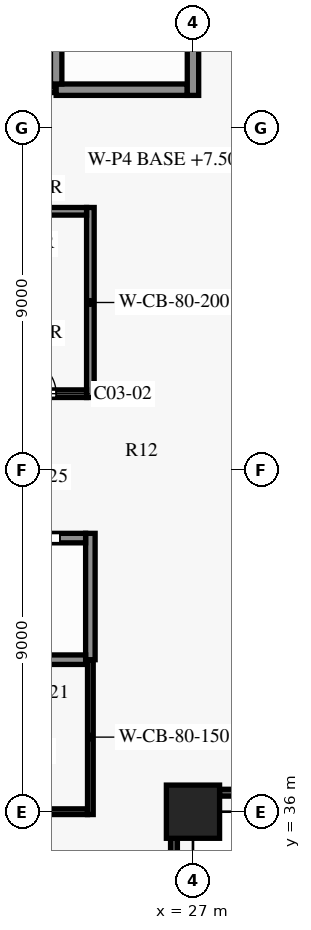
"""IFC4 building model, lengths in metres.
Left out: names, types, materials, properties, quantities, classifications, styles, units other than length and angle.
Written with IfcOpenShell. Run it as: python <this file> out.ifc"""

import sys

from ifc_helpers import new_model, si_unit, direction, frame, frame_2d, origin, origin_2d, place, context, subcontext, project, spatial, rectangle, extrude, element, fill, save


model = new_model("IFC4")
c1 = context("Model", 3, precision=1e-05, world=origin(), true_north=direction((0.0, 1.0)))
c2 = subcontext(c1, "Body", "Model", "MODEL_VIEW")
j1 = project(units=[si_unit("LENGTHUNIT", "METRE"), si_unit("PLANEANGLEUNIT", "RADIAN")], contexts=[c1])
p1 = place(None, origin())
s1 = spatial("IfcSite", under=j1, at=p1, CompositionType="ELEMENT")
p2 = place(p1, origin())
s2 = spatial("IfcBuilding", under=s1, at=p2, CompositionType="ELEMENT")
p3 = place(p2, frame((0.0, 0.0, 7.5)))
s3 = spatial("IfcBuildingStorey", under=s2, at=p3, CompositionType="ELEMENT", Elevation=7.5)
p4 = place(p3, frame((27.0, 36.0, 0.0), z_axis=(0.0, 0.0, 1.0), x_axis=(1.0, 0.0, 0.0)))
e1 = element("IfcColumn", 1, at=p4, inside=s3, PredefinedType="COLUMN", context=c2, shape_type="SweptSolid", body=[
    extrude(rectangle(XDim=1.4, YDim=1.4, at=origin_2d()), origin(), (0.0, 0.0, 1.0), 7.0),
])
p5 = place(p3, frame((12.4, 36.0, 0.0), z_axis=(0.0, 0.0, 1.0), x_axis=(1.0, 0.0, 0.0)))
e2 = element("IfcWall", 2, at=p5, inside=s3, PredefinedType="SHEAR", context=c2, shape_type="SweptSolid", body=[
    extrude(rectangle(XDim=11.825, YDim=0.15, at=frame_2d((5.913, 0.0))), origin(), (0.0, 0.0, 1.0), 6.7),
])
p6 = place(p5, frame((1.525, 0.0, 0.0)))
e3 = element("IfcOpeningElement", 3, at=p6, cuts=e2, PredefinedType="OPENING", context=c2, shape_type="SweptSolid", body=[
    extrude(rectangle(XDim=0.95, YDim=2.1, at=frame_2d((0.475, 1.05))), frame((0.0, 0.085, 0.0), z_axis=(0.0, -1.0, 0.0), x_axis=(1.0, 0.0, 0.0)), (0.0, 0.0, 1.0), 0.17),
])
p7 = place(p5, frame((5.75, 0.0, 0.0)))
e4 = element("IfcOpeningElement", 4, at=p7, cuts=e2, PredefinedType="OPENING", context=c2, shape_type="SweptSolid", body=[
    extrude(rectangle(XDim=0.9, YDim=2.1, at=frame_2d((0.45, 1.05))), frame((0.0, 0.085, 0.0), z_axis=(0.0, -1.0, 0.0), x_axis=(1.0, 0.0, 0.0)), (0.0, 0.0, 1.0), 0.17),
])
p8 = place(p5, frame((9.7, 0.0, 0.0)))
e5 = element("IfcOpeningElement", 5, at=p8, cuts=e2, PredefinedType="OPENING", context=c2, shape_type="SweptSolid", body=[
    extrude(rectangle(XDim=0.9, YDim=2.1, at=frame_2d((0.45, 1.05))), frame((0.0, 0.085, 0.0), z_axis=(0.0, -1.0, 0.0), x_axis=(1.0, 0.0, 0.0)), (0.0, 0.0, 1.0), 0.17),
])
p9 = place(p3, frame((8.1, 40.0, 0.0), z_axis=(0.0, 0.0, 1.0), x_axis=(1.0, 0.0, 0.0)))
e6 = element("IfcWall", 6, at=p9, inside=s3, PredefinedType="SHEAR", context=c2, shape_type="SweptSolid", body=[
    extrude(rectangle(XDim=16.075, YDim=0.25, at=frame_2d((8.038, 0.0))), origin(), (0.0, 0.0, 1.0), 6.7),
])
p10 = place(p3, frame((8.1, 43.2, 0.0), z_axis=(0.0, 0.0, 1.0), x_axis=(1.0, 0.0, 0.0)))
e7 = element("IfcWall", 7, at=p10, inside=s3, PredefinedType="SHEAR", context=c2, shape_type="SweptSolid", body=[
    extrude(rectangle(XDim=16.075, YDim=0.25, at=frame_2d((8.038, 0.0))), origin(), (0.0, 0.0, 1.0), 6.7),
])
p11 = place(p10, frame((14.3, 0.0, 0.0)))
e8 = element("IfcOpeningElement", 8, at=p11, cuts=e7, PredefinedType="OPENING", context=c2, shape_type="SweptSolid", body=[
    extrude(rectangle(XDim=1.1, YDim=2.1, at=frame_2d((0.55, 1.05))), frame((0.0, 0.135, 0.0), z_axis=(0.0, -1.0, 0.0), x_axis=(1.0, 0.0, 0.0)), (0.0, 0.0, 1.0), 0.27),
])
p12 = place(p10, frame((0.8, 0.0, 0.0)))
e9 = element("IfcOpeningElement", 9, at=p12, cuts=e7, PredefinedType="OPENING", context=c2, shape_type="SweptSolid", body=[
    extrude(rectangle(XDim=1.1, YDim=2.1, at=frame_2d((0.55, 1.05))), frame((0.0, 0.135, 0.0), z_axis=(0.0, -1.0, 0.0), x_axis=(1.0, 0.0, 0.0)), (0.0, 0.0, 1.0), 0.27),
])
p13 = place(p10, frame((3.5, 0.0, 0.0)))
e10 = element("IfcOpeningElement", 10, at=p13, cuts=e7, PredefinedType="OPENING", context=c2, shape_type="SweptSolid", body=[
    extrude(rectangle(XDim=1.1, YDim=2.1, at=frame_2d((0.55, 1.05))), frame((0.0, 0.135, 0.0), z_axis=(0.0, -1.0, 0.0), x_axis=(1.0, 0.0, 0.0)), (0.0, 0.0, 1.0), 0.27),
])
p14 = place(p10, frame((6.2, 0.0, 0.0)))
e11 = element("IfcOpeningElement", 11, at=p14, cuts=e7, PredefinedType="OPENING", context=c2, shape_type="SweptSolid", body=[
    extrude(rectangle(XDim=1.1, YDim=2.1, at=frame_2d((0.55, 1.05))), frame((0.0, 0.135, 0.0), z_axis=(0.0, -1.0, 0.0), x_axis=(1.0, 0.0, 0.0)), (0.0, 0.0, 1.0), 0.27),
])
p15 = place(p10, frame((8.9, 0.0, 0.0)))
e12 = element("IfcOpeningElement", 12, at=p15, cuts=e7, PredefinedType="OPENING", context=c2, shape_type="SweptSolid", body=[
    extrude(rectangle(XDim=1.1, YDim=2.1, at=frame_2d((0.55, 1.05))), frame((0.0, 0.135, 0.0), z_axis=(0.0, -1.0, 0.0), x_axis=(1.0, 0.0, 0.0)), (0.0, 0.0, 1.0), 0.27),
])
p16 = place(p10, frame((11.6, 0.0, 0.0)))
e13 = element("IfcOpeningElement", 13, at=p16, cuts=e7, PredefinedType="OPENING", context=c2, shape_type="SweptSolid", body=[
    extrude(rectangle(XDim=1.1, YDim=2.1, at=frame_2d((0.55, 1.05))), frame((0.0, 0.135, 0.0), z_axis=(0.0, -1.0, 0.0), x_axis=(1.0, 0.0, 0.0)), (0.0, 0.0, 1.0), 0.27),
])
p17 = place(p3, frame((21.6, 47.0, 0.0), z_axis=(0.0, 0.0, 1.0), x_axis=(1.0, 0.0, 0.0)))
e14 = element("IfcWall", 14, at=p17, inside=s3, PredefinedType="PARTITIONING", context=c2, shape_type="SweptSolid", body=[
    extrude(rectangle(XDim=2.6, YDim=0.2, at=frame_2d((1.3, 0.0))), origin(), (0.0, 0.0, 1.0), 6.7),
])
p18 = place(p17, frame((0.9, 0.0, 0.0)))
e15 = element("IfcOpeningElement", 15, at=p18, cuts=e14, PredefinedType="OPENING", context=c2, shape_type="SweptSolid", body=[
    extrude(rectangle(XDim=0.9, YDim=2.1, at=frame_2d((0.45, 1.05))), frame((0.0, 0.11, 0.0), z_axis=(0.0, -1.0, 0.0), x_axis=(1.0, 0.0, 0.0)), (0.0, 0.0, 1.0), 0.22),
])
p19 = place(p3, frame((21.6, 51.8, 0.0), z_axis=(0.0, 0.0, 1.0), x_axis=(1.0, 0.0, 0.0)))
e16 = element("IfcWall", 16, at=p19, inside=s3, PredefinedType="PARTITIONING", context=c2, shape_type="SweptSolid", body=[
    extrude(rectangle(XDim=2.6, YDim=0.2, at=frame_2d((1.3, 0.0))), origin(), (0.0, 0.0, 1.0), 6.7),
])
p20 = place(p3, frame((13.5, 55.0, 0.0), z_axis=(0.0, 0.0, 1.0), x_axis=(1.0, 0.0, 0.0)))
e17 = element("IfcWall", 17, at=p20, inside=s3, PredefinedType="PARTITIONING", context=c2, shape_type="SweptSolid", body=[
    extrude(rectangle(XDim=9.9, YDim=0.15, at=frame_2d((4.95, 0.0))), origin(), (0.0, 0.0, 1.0), 6.7),
])
p21 = place(p20, frame((2.45, 0.0, 0.0)))
e18 = element("IfcOpeningElement", 18, at=p21, cuts=e17, PredefinedType="OPENING", context=c2, shape_type="SweptSolid", body=[
    extrude(rectangle(XDim=1.0, YDim=2.1, at=frame_2d((0.5, 1.05))), frame((0.0, 0.085, 0.0), z_axis=(0.0, -1.0, 0.0), x_axis=(1.0, 0.0, 0.0)), (0.0, 0.0, 1.0), 0.17),
])
p22 = place(p20, frame((7.4, 0.0, 0.0)))
e19 = element("IfcOpeningElement", 19, at=p22, cuts=e17, PredefinedType="OPENING", context=c2, shape_type="SweptSolid", body=[
    extrude(rectangle(XDim=1.0, YDim=2.1, at=frame_2d((0.5, 1.05))), frame((0.0, 0.085, 0.0), z_axis=(0.0, -1.0, 0.0), x_axis=(1.0, 0.0, 0.0)), (0.0, 0.0, 1.0), 0.17),
])
p23 = place(p3, frame((23.4, 55.0, 0.0), z_axis=(0.0, 0.0, 1.0), x_axis=(1.0, 0.0, 0.0)))
e20 = element("IfcWall", 20, at=p23, inside=s3, PredefinedType="SHEAR", context=c2, shape_type="SweptSolid", body=[
    extrude(rectangle(XDim=3.45, YDim=0.3, at=frame_2d((1.725, 0.0))), origin(), (0.0, 0.0, 1.0), 6.7),
])
p24 = place(p3, frame((23.4, 55.15, 0.0), z_axis=(0.0, 0.0, 1.0), x_axis=(0.0, 1.0, 0.0)))
e21 = element("IfcWall", 21, at=p24, inside=s3, PredefinedType="SHEAR", context=c2, shape_type="SweptSolid", body=[
    extrude(rectangle(XDim=8.0, YDim=0.3, at=frame_2d((4.0, 0.0))), origin(), (0.0, 0.0, 1.0), 6.7),
])
p25 = place(p3, frame((24.3, 35.925, 0.0), z_axis=(0.0, 0.0, 1.0), x_axis=(0.0, 1.0, 0.0)))
e22 = element("IfcWall", 22, at=p25, inside=s3, PredefinedType="SHEAR", context=c2, shape_type="SweptSolid", body=[
    extrude(rectangle(XDim=4.075, YDim=0.15, at=frame_2d((2.038, 0.0))), origin(), (0.0, 0.0, 1.0), 6.7),
])
p26 = place(p3, frame((24.3, 46.9, 0.0), z_axis=(0.0, 0.0, 1.0), x_axis=(0.0, 1.0, 0.0)))
e23 = element("IfcWall", 23, at=p26, inside=s3, PredefinedType="SHEAR", context=c2, shape_type="SweptSolid", body=[
    extrude(rectangle(XDim=5.0, YDim=0.2, at=frame_2d((2.5, 0.0))), origin(), (0.0, 0.0, 1.0), 6.7),
])
p27 = place(p3, frame((24.3, 40.0, 0.0), z_axis=(0.0, 0.0, 1.0), x_axis=(0.0, 1.0, 0.0)))
e24 = element("IfcWall", 24, at=p27, inside=s3, PredefinedType="SHEAR", context=c2, shape_type="SweptSolid", body=[
    extrude(rectangle(XDim=3.325, YDim=0.25, at=frame_2d((1.663, 0.0))), origin(), (0.0, 0.0, 1.0), 6.7),
])
p28 = place(p3, frame((27.0, 54.85, 0.0), z_axis=(0.0, 0.0, 1.0), x_axis=(0.0, 1.0, 0.0)))
e25 = element("IfcWall", 25, at=p28, inside=s3, PredefinedType="SHEAR", context=c2, shape_type="SweptSolid", body=[
    extrude(rectangle(XDim=8.35, YDim=0.3, at=frame_2d((4.175, 0.0))), origin(), (0.0, 0.0, 1.0), 6.7),
])
p29 = place(p28, frame((6.55, 0.0, 0.0)))
e26 = element("IfcOpeningElement", 26, at=p29, cuts=e25, PredefinedType="OPENING", context=c2, shape_type="SweptSolid", body=[
    extrude(rectangle(XDim=1.2, YDim=2.2, at=frame_2d((0.6, 1.1))), frame((0.0, 0.16, 0.0), z_axis=(0.0, -1.0, 0.0), x_axis=(1.0, 0.0, 0.0)), (0.0, 0.0, 1.0), 0.32),
])
p30 = place(p18, origin())
e27 = element("IfcDoor", 27, at=p30, inside=s3, OperationType="SINGLE_SWING_LEFT", PredefinedType="DOOR", context=c2, shape_type="SweptSolid", body=[
    extrude(rectangle(XDim=0.9, YDim=2.1, at=frame_2d((0.45, 1.05))), frame((0.0, 0.025, 0.0), z_axis=(0.0, -1.0, 0.0), x_axis=(1.0, 0.0, 0.0)), (0.0, 0.0, 1.0), 0.05),
])
fill(e15, e27)
p31 = place(p11, origin())
e28 = element("IfcDoor", 28, at=p31, inside=s3, OperationType="DOUBLE_DOOR_SLIDING", PredefinedType="DOOR", context=c2, shape_type="SweptSolid", body=[
    extrude(rectangle(XDim=1.1, YDim=2.1, at=frame_2d((0.55, 1.05))), frame((0.0, 0.025, 0.0), z_axis=(0.0, -1.0, 0.0), x_axis=(1.0, 0.0, 0.0)), (0.0, 0.0, 1.0), 0.05),
])
fill(e8, e28)
save(model, sys.argv[1])
